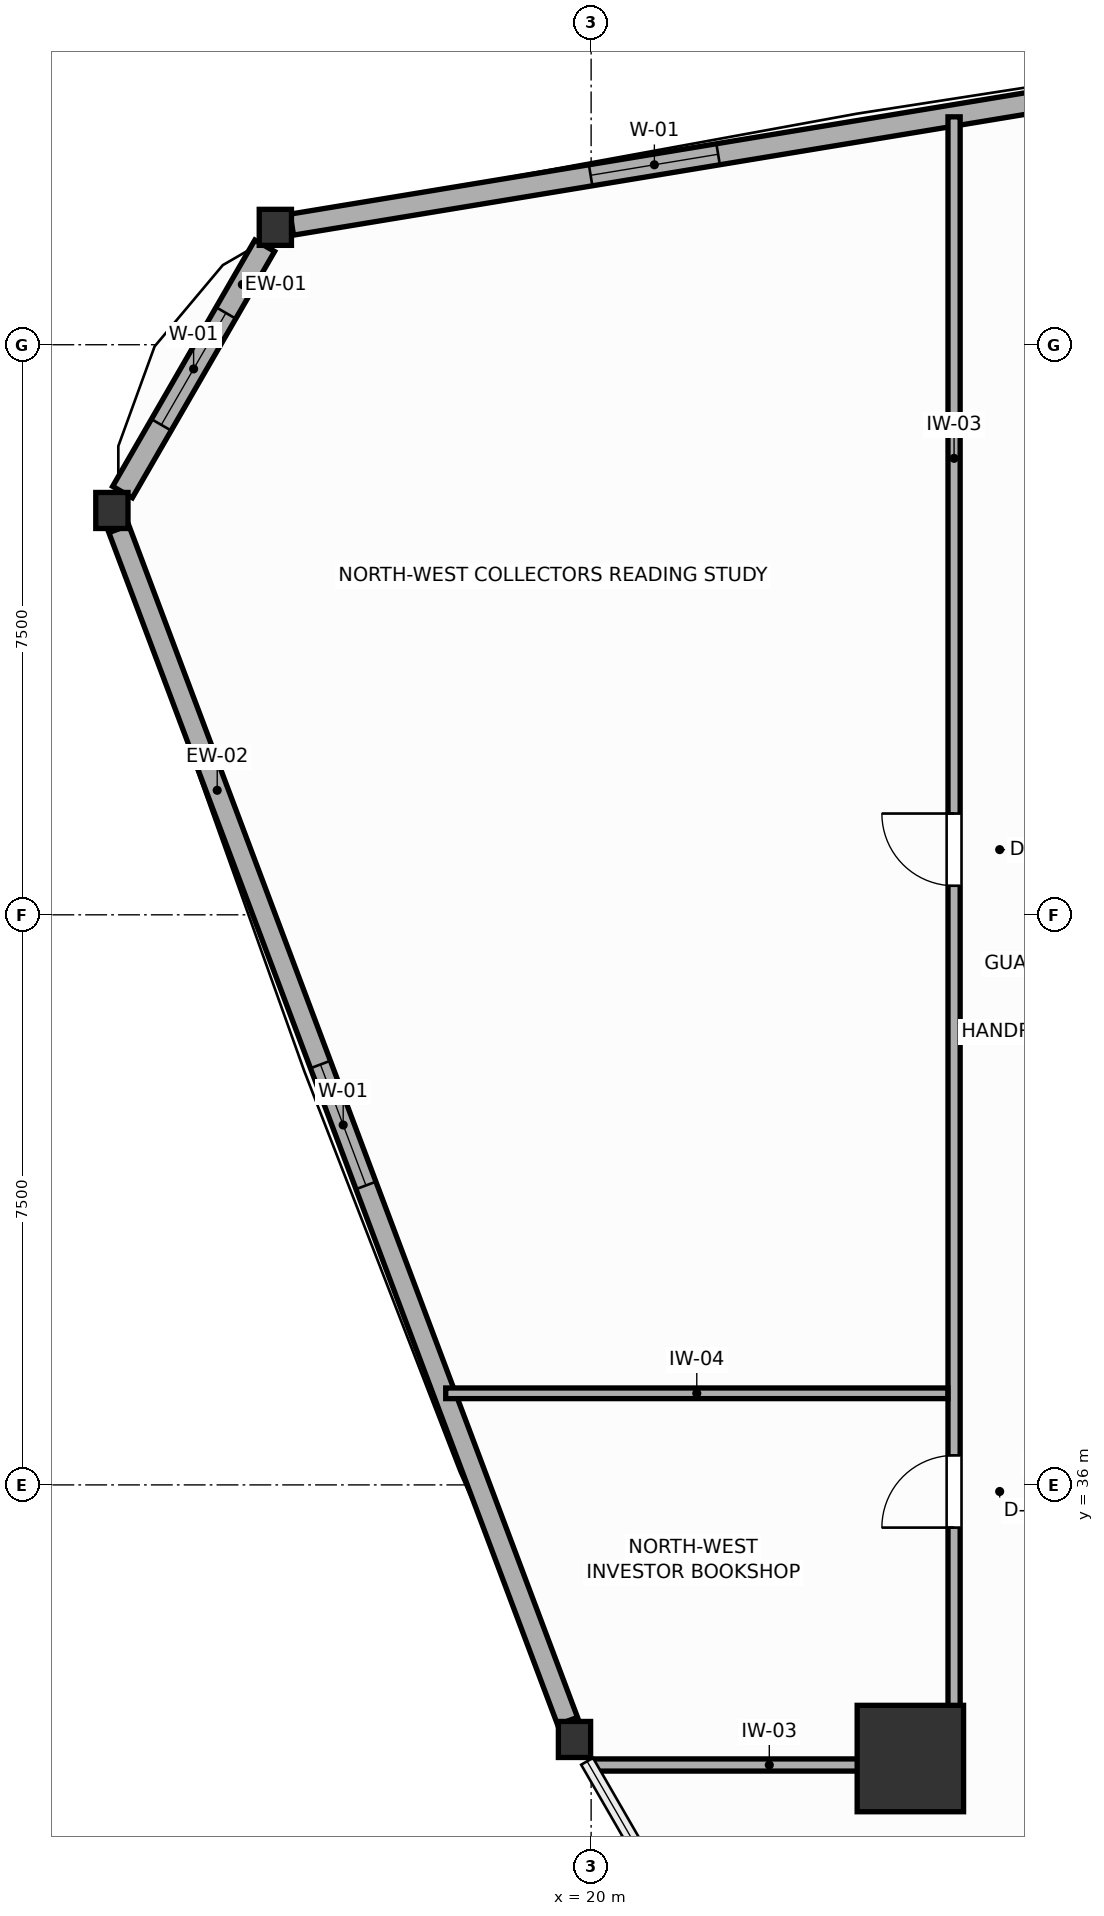
"""IFC4 building model, lengths in metres.
Left out: names, types, materials, properties, quantities, classifications, styles, units other than length and angle.
Written with IfcOpenShell. Run it as: python <this file> out.ifc"""

import sys

from ifc_helpers import new_model, si_unit, direction, frame, frame_2d, origin, origin_2d, place, context, subcontext, project, spatial, rectangle, i_section, extrude, source, transform, mapped, element, fill, save


model = new_model("IFC4")
c1 = context("Model", 3, precision=1e-05, world=origin(), true_north=direction((0.0, 1.0)))
c2 = subcontext(c1, "Body", "Model", "MODEL_VIEW")
j1 = project(units=[si_unit("LENGTHUNIT", "METRE"), si_unit("PLANEANGLEUNIT", "RADIAN")], contexts=[c1])
p1 = place(None, origin())
s1 = spatial("IfcSite", under=j1, at=p1, CompositionType="ELEMENT")
p2 = place(p1, origin())
s2 = spatial("IfcBuilding", under=s1, at=p2, CompositionType="ELEMENT")
p3 = place(p2, frame((0.0, 0.0, 91.2)))
s3 = spatial("IfcBuildingStorey", under=s2, at=p3, CompositionType="ELEMENT", Elevation=91.2)
m1 = source(origin(), c2, "Body", "SweptSolid", [
    extrude(rectangle(XDim=1.4, YDim=1.4, at=origin_2d()), origin(), (0.0, 0.0, 1.0), 3.9),
])
p4 = place(p3, frame((24.2, 32.4, 0.0), z_axis=(0.0, 0.0, 1.0), x_axis=(1.0, 0.0, 0.0)))
e1 = element("IfcColumn", 1, at=p4, inside=s3, PredefinedType="COLUMN", context=c2, shape_type="MappedRepresentation", body=[
    mapped(m1, transform((0.0, 0.0, 0.0), scale=1.0)),
])
m2 = source(origin(), c2, "Body", "SweptSolid", [
    extrude(i_section(OverallWidth=0.424, OverallDepth=0.474, WebThickness=0.045, FlangeThickness=0.072, FilletRadius=0.015, at=origin_2d()), origin(), (0.0, 0.0, 1.0), 3.9),
])
for number, where, z_axis, x_axis in (
    (2, (15.845, 52.544, 0.0), (0.0, 0.0, 1.0), (1.0, 0.0, 0.0)),
    (3, (13.695, 48.82, 0.0), (0.0, 0.0, 1.0), (1.0, 0.0, 0.0)),
    (4, (19.781, 32.651, 0.0), (0.0, 0.0, 1.0), (1.0, 0.0, 0.0)),
):
    element("IfcColumn", number, at=place(p3, frame(where, z_axis=z_axis, x_axis=x_axis)), inside=s3, PredefinedType="COLUMN", context=c2, shape_type="MappedRepresentation", body=[
        mapped(m2, transform((0.0, 0.0, 0.0), scale=1.0)),
    ])
p5 = place(p3, frame((32.674, 55.322, 0.0), z_axis=(0.0, 0.0, 1.0), x_axis=(-0.986649424809, -0.162858566012, 0.0)))
e5 = element("IfcWall", 5, at=p5, inside=s3, PredefinedType="SOLIDWALL", context=c2, shape_type="SweptSolid", body=[
    extrude(rectangle(XDim=16.836, YDim=0.28, at=frame_2d((8.418, 0.0))), origin(), (0.0, 0.0, 1.0), 3.23),
])
p6 = place(p5, frame((11.152, 0.0, 0.75)))
e6 = element("IfcOpeningElement", 6, at=p6, cuts=e5, PredefinedType="OPENING", context=c2, shape_type="SweptSolid", body=[
    extrude(rectangle(XDim=1.7, YDim=1.75, at=frame_2d((0.85, 0.875))), frame((0.0, 0.15, 0.0), z_axis=(0.0, -1.0, 0.0), x_axis=(1.0, 0.0, 0.0)), (0.0, 0.0, 1.0), 0.3),
])
p7 = place(p3, frame((15.706, 52.302, 0.0), z_axis=(0.0, 0.0, 1.0), x_axis=(-0.500012356405, -0.866018269693, 0.0)))
e7 = element("IfcWall", 7, at=p7, inside=s3, PredefinedType="SOLIDWALL", context=c2, shape_type="SweptSolid", body=[
    extrude(rectangle(XDim=3.742, YDim=0.3, at=frame_2d((1.871, 0.0))), origin(), (0.0, 0.0, 1.0), 3.23),
])
p8 = place(p7, frame((1.021, 0.0, 0.75)))
e8 = element("IfcOpeningElement", 8, at=p8, cuts=e7, PredefinedType="OPENING", context=c2, shape_type="SweptSolid", body=[
    extrude(rectangle(XDim=1.7, YDim=1.75, at=frame_2d((0.85, 0.875))), frame((0.0, 0.16, 0.0), z_axis=(0.0, -1.0, 0.0), x_axis=(1.0, 0.0, 0.0)), (0.0, 0.0, 1.0), 0.32),
])
p9 = place(p3, frame((13.786, 48.577, 0.0), z_axis=(0.0, 0.0, 1.0), x_axis=(0.352279020809, -0.935895021622, 0.0)))
e9 = element("IfcWall", 9, at=p9, inside=s3, PredefinedType="SOLIDWALL", context=c2, shape_type="SweptSolid", body=[
    extrude(rectangle(XDim=16.759, YDim=0.28, at=frame_2d((8.379, 0.0))), origin(), (0.0, 0.0, 1.0), 3.23),
])
p10 = place(p9, frame((7.53, 0.0, 0.75)))
e10 = element("IfcOpeningElement", 10, at=p10, cuts=e9, PredefinedType="OPENING", context=c2, shape_type="SweptSolid", body=[
    extrude(rectangle(XDim=1.7, YDim=1.75, at=frame_2d((0.85, 0.875))), frame((0.0, 0.15, 0.0), z_axis=(0.0, -1.0, 0.0), x_axis=(1.0, 0.0, 0.0)), (0.0, 0.0, 1.0), 0.3),
])
p11 = place(p3, frame((24.775, 32.31, 0.0), z_axis=(0.0, 0.0, 1.0), x_axis=(0.0, 1.0, 0.0)))
e11 = element("IfcWall", 11, at=p11, inside=s3, PredefinedType="PARTITIONING", context=c2, shape_type="SweptSolid", body=[
    extrude(rectangle(XDim=21.688, YDim=0.16, at=frame_2d((10.844, 0.0))), origin(), (0.0, 0.0, 1.0), 3.68),
])
p12 = place(p11, frame((3.128, 0.0, 0.0)))
e12 = element("IfcOpeningElement", 12, at=p12, cuts=e11, PredefinedType="OPENING", context=c2, shape_type="SweptSolid", body=[
    extrude(rectangle(XDim=0.95, YDim=2.05, at=frame_2d((0.475, 1.025))), frame((0.0, 0.09, 0.0), z_axis=(0.0, -1.0, 0.0), x_axis=(1.0, 0.0, 0.0)), (0.0, 0.0, 1.0), 0.18),
])
p13 = place(p11, frame((11.573, 0.0, 0.0)))
e13 = element("IfcOpeningElement", 13, at=p13, cuts=e11, PredefinedType="OPENING", context=c2, shape_type="SweptSolid", body=[
    extrude(rectangle(XDim=0.95, YDim=2.05, at=frame_2d((0.475, 1.025))), frame((0.0, 0.09, 0.0), z_axis=(0.0, -1.0, 0.0), x_axis=(1.0, 0.0, 0.0)), (0.0, 0.0, 1.0), 0.18),
])
p14 = place(p3, frame((19.995, 32.315, 0.0), z_axis=(0.0, 0.0, 1.0), x_axis=(1.0, 0.0, 0.0)))
e14 = element("IfcWall", 14, at=p14, inside=s3, PredefinedType="PARTITIONING", context=c2, shape_type="SweptSolid", body=[
    extrude(rectangle(XDim=4.698, YDim=0.16, at=frame_2d((2.349, 0.0))), origin(), (0.0, 0.0, 1.0), 3.18),
])
p15 = place(p3, frame((18.087, 37.205, 0.0), z_axis=(0.0, 0.0, 1.0), x_axis=(1.0, 0.0, 0.0)))
e15 = element("IfcWall", 15, at=p15, inside=s3, PredefinedType="PARTITIONING", context=c2, shape_type="SweptSolid", body=[
    extrude(rectangle(XDim=6.606, YDim=0.14, at=frame_2d((3.303, 0.0))), origin(), (0.0, 0.0, 1.0), 3.68),
])
p16 = place(p6, origin())
e16 = element("IfcWindow", 16, at=p16, inside=s3, PartitioningType="SINGLE_PANEL", PredefinedType="WINDOW", context=c2, shape_type="SweptSolid", body=[
    extrude(rectangle(XDim=1.7, YDim=1.75, at=frame_2d((0.85, 0.875))), frame((0.0, 0.03, 0.0), z_axis=(0.0, -1.0, 0.0), x_axis=(1.0, 0.0, 0.0)), (0.0, 0.0, 1.0), 0.06),
])
fill(e6, e16)
p17 = place(p8, origin())
e17 = element("IfcWindow", 17, at=p17, inside=s3, PartitioningType="SINGLE_PANEL", PredefinedType="WINDOW", context=c2, shape_type="SweptSolid", body=[
    extrude(rectangle(XDim=1.7, YDim=1.75, at=frame_2d((0.85, 0.875))), frame((0.0, 0.03, 0.0), z_axis=(0.0, -1.0, 0.0), x_axis=(1.0, 0.0, 0.0)), (0.0, 0.0, 1.0), 0.06),
])
fill(e8, e17)
p18 = place(p10, origin())
e18 = element("IfcWindow", 18, at=p18, inside=s3, PartitioningType="SINGLE_PANEL", PredefinedType="WINDOW", context=c2, shape_type="SweptSolid", body=[
    extrude(rectangle(XDim=1.7, YDim=1.75, at=frame_2d((0.85, 0.875))), frame((0.0, 0.03, 0.0), z_axis=(0.0, -1.0, 0.0), x_axis=(1.0, 0.0, 0.0)), (0.0, 0.0, 1.0), 0.06),
])
fill(e10, e18)
p19 = place(p12, origin())
e19 = element("IfcDoor", 19, at=p19, inside=s3, OperationType="SINGLE_SWING_LEFT", PredefinedType="DOOR", context=c2, shape_type="SweptSolid", body=[
    extrude(rectangle(XDim=0.95, YDim=2.05, at=frame_2d((0.475, 1.025))), frame((0.0, 0.025, 0.0), z_axis=(0.0, -1.0, 0.0), x_axis=(1.0, 0.0, 0.0)), (0.0, 0.0, 1.0), 0.05),
])
fill(e12, e19)
p20 = place(p13, origin())
e20 = element("IfcDoor", 20, at=p20, inside=s3, OperationType="SINGLE_SWING_RIGHT", PredefinedType="DOOR", context=c2, shape_type="SweptSolid", body=[
    extrude(rectangle(XDim=0.95, YDim=2.05, at=frame_2d((0.475, 1.025))), frame((0.0, 0.025, 0.0), z_axis=(0.0, -1.0, 0.0), x_axis=(1.0, 0.0, 0.0)), (0.0, 0.0, 1.0), 0.05),
])
fill(e13, e20)
save(model, sys.argv[1])
